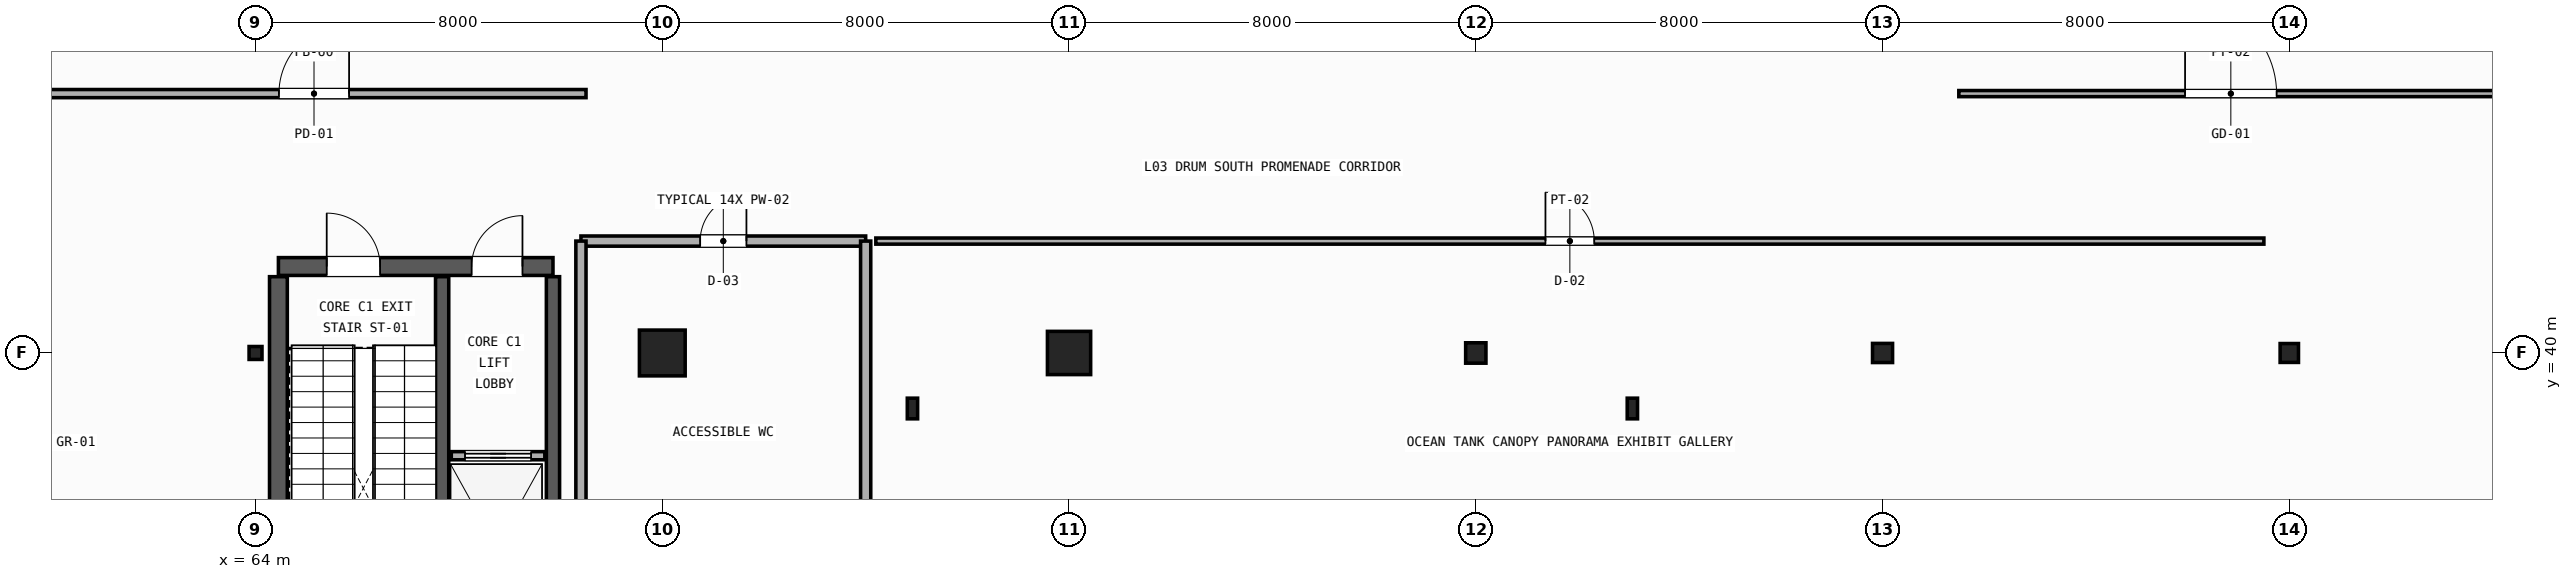
"""IFC4 building model, lengths in metres.
Left out: names, types, materials, properties, quantities, classifications, styles, units other than length and angle.
Written with IfcOpenShell. Run it as: python <this file> out.ifc"""

import sys

from ifc_helpers import new_model, si_unit, direction, frame, frame_2d, origin, origin_2d, place, context, subcontext, project, spatial, rectangle, hollow_rectangle, circle, i_section, extrude, element, fill, save


model = new_model("IFC4")
c1 = context("Model", 3, precision=1e-05, world=origin(), true_north=direction((0.0, 1.0)))
c2 = subcontext(c1, "Body", "Model", "MODEL_VIEW")
j1 = project(units=[si_unit("LENGTHUNIT", "METRE"), si_unit("PLANEANGLEUNIT", "RADIAN")], contexts=[c1])
p1 = place(None, origin())
s1 = spatial("IfcSite", under=j1, at=p1, CompositionType="ELEMENT")
p2 = place(p1, origin())
s2 = spatial("IfcBuilding", under=s1, at=p2, CompositionType="ELEMENT")
p3 = place(p2, frame((0.0, 0.0, 15.0)))
s3 = spatial("IfcBuildingStorey", under=s2, at=p3, CompositionType="ELEMENT", Elevation=15.0)
p4 = place(p3, frame((64.0, 40.0, 0.0), z_axis=(0.0, 0.0, 1.0), x_axis=(1.0, 0.0, 0.0)))
e1 = element("IfcColumn", 1, at=p4, inside=s3, PredefinedType="COLUMN", context=c2, shape_type="SweptSolid", body=[
    extrude(hollow_rectangle(XDim=0.254, YDim=0.254, WallThickness=0.012, InnerFilletRadius=0.012, OuterFilletRadius=0.024, at=origin_2d()), origin(), (0.0, 0.0, 1.0), 4.56),
])
p5 = place(p3, frame((72.0, 40.0, 0.0), z_axis=(0.0, 0.0, 1.0), x_axis=(0.0, 1.0, 0.0)))
e2 = element("IfcColumn", 2, at=p5, inside=s3, PredefinedType="COLUMN", context=c2, shape_type="SweptSolid", body=[
    extrude(rectangle(XDim=0.9, YDim=0.9, at=origin_2d()), origin(), (0.0, 0.0, 1.0), 4.56),
])
p6 = place(p3, frame((80.0, 40.0, 0.0), z_axis=(0.0, 0.0, 1.0), x_axis=(1.0, 0.0, 0.0)))
e3 = element("IfcColumn", 3, at=p6, inside=s3, PredefinedType="COLUMN", context=c2, shape_type="SweptSolid", body=[
    extrude(circle(Radius=0.425, at=origin_2d()), origin(), (0.0, 0.0, 1.0), 4.56),
])
p7 = place(p3, frame((88.0, 40.0, 0.0), z_axis=(0.0, 0.0, 1.0), x_axis=(0.0, 1.0, 0.0)))
e4 = element("IfcColumn", 4, at=p7, inside=s3, PredefinedType="COLUMN", context=c2, shape_type="SweptSolid", body=[
    extrude(i_section(OverallWidth=0.401, OverallDepth=0.399, WebThickness=0.025, FlangeThickness=0.04, FilletRadius=0.015, at=origin_2d()), origin(), (0.0, 0.0, 1.0), 4.56),
])
p8 = place(p3, frame((96.0, 40.0, 0.0), z_axis=(0.0, 0.0, 1.0), x_axis=(1.0, 0.0, 0.0)))
e5 = element("IfcColumn", 5, at=p8, inside=s3, PredefinedType="COLUMN", context=c2, shape_type="SweptSolid", body=[
    extrude(i_section(OverallWidth=0.394, OverallDepth=0.376, WebThickness=0.017, FlangeThickness=0.028, FilletRadius=0.015, at=origin_2d()), origin(), (0.0, 0.0, 1.0), 4.56),
])
p9 = place(p3, frame((104.0, 40.0, 0.0), z_axis=(0.0, 0.0, 1.0), x_axis=(0.0, 1.0, 0.0)))
e6 = element("IfcColumn", 6, at=p9, inside=s3, PredefinedType="COLUMN", context=c2, shape_type="SweptSolid", body=[
    extrude(i_section(OverallWidth=0.371, OverallDepth=0.361, WebThickness=0.012, FlangeThickness=0.02, FilletRadius=0.015, at=origin_2d()), origin(), (0.0, 0.0, 1.0), 4.56),
])
for number, where, z_axis, x_axis in (
    (7, (76.92, 38.908, 0.0), (0.0, 0.0, 1.0), (1.0, 0.0, 0.0)),
    (8, (91.08, 38.908, 0.0), (0.0, 0.0, 1.0), (1.0, 0.0, 0.0)),
):
    element("IfcColumn", number, at=place(p3, frame(where, z_axis=z_axis, x_axis=x_axis)), inside=s3, PredefinedType="COLUMN", context=c2, shape_type="SweptSolid", body=[
        extrude(hollow_rectangle(XDim=0.203, YDim=0.406, WallThickness=0.012, InnerFilletRadius=0.012, OuterFilletRadius=0.024, at=origin_2d()), origin(), (0.0, 0.0, 1.0), 4.54),
    ])
p10 = place(p3, frame((64.45, 41.7, 0.0), z_axis=(0.0, 0.0, 1.0), x_axis=(1.0, 0.0, 0.0)))
e9 = element("IfcWall", 9, at=p10, inside=s3, PredefinedType="SHEAR", context=c2, shape_type="SweptSolid", body=[
    extrude(rectangle(XDim=5.4, YDim=0.35, at=frame_2d((2.7, 0.0))), origin(), (0.0, 0.0, 1.0), 4.55),
])
p11 = place(p10, frame((0.95, 0.0, 0.0)))
e10 = element("IfcOpeningElement", 10, at=p11, cuts=e9, PredefinedType="OPENING", context=c2, shape_type="SweptSolid", body=[
    extrude(rectangle(XDim=1.05, YDim=2.1, at=frame_2d((0.525, 1.05))), frame((0.0, 0.185, 0.0), z_axis=(0.0, -1.0, 0.0), x_axis=(1.0, 0.0, 0.0)), (0.0, 0.0, 1.0), 0.37),
])
p12 = place(p10, frame((3.8, 0.0, 0.0)))
e11 = element("IfcOpeningElement", 11, at=p12, cuts=e9, PredefinedType="OPENING", context=c2, shape_type="SweptSolid", body=[
    extrude(rectangle(XDim=1.0, YDim=2.15, at=frame_2d((0.5, 1.075))), frame((0.0, 0.185, 0.0), z_axis=(0.0, -1.0, 0.0), x_axis=(1.0, 0.0, 0.0)), (0.0, 0.0, 1.0), 0.37),
])
p13 = place(p3, frame((64.45, 34.55, 0.0), z_axis=(0.0, 0.0, 1.0), x_axis=(0.0, 1.0, 0.0)))
e12 = element("IfcWall", 12, at=p13, inside=s3, PredefinedType="SHEAR", context=c2, shape_type="SweptSolid", body=[
    extrude(rectangle(XDim=6.95, YDim=0.35, at=frame_2d((3.475, 0.0))), origin(), (0.0, 0.0, 1.0), 4.55),
])
for number, where, z_axis, x_axis in (
    (13, (69.85, 34.55, 0.0), (0.0, 0.0, 1.0), (0.0, 1.0, 0.0)),
    (14, (67.67, 34.55, 0.0), (0.0, 0.0, 1.0), (0.0, 1.0, 0.0)),
):
    element("IfcWall", number, at=place(p3, frame(where, z_axis=z_axis, x_axis=x_axis)), inside=s3, PredefinedType="SHEAR", context=c2, shape_type="SweptSolid", body=[
        extrude(rectangle(XDim=6.95, YDim=0.26, at=frame_2d((3.475, 0.0))), origin(), (0.0, 0.0, 1.0), 4.55),
    ])
p14 = place(p3, frame((67.85, 37.98, 0.0), z_axis=(0.0, 0.0, 1.0), x_axis=(1.0, 0.0, 0.0)))
e15 = element("IfcWall", 15, at=p14, inside=s3, PredefinedType="PARTITIONING", context=c2, shape_type="SweptSolid", body=[
    extrude(rectangle(XDim=1.84, YDim=0.16, at=frame_2d((0.92, 0.0))), origin(), (0.0, 0.0, 1.0), 3.6),
])
p15 = place(p14, frame((0.27, 0.0, 0.0)))
e16 = element("IfcOpeningElement", 16, at=p15, cuts=e15, PredefinedType="OPENING", context=c2, shape_type="SweptSolid", body=[
    extrude(rectangle(XDim=1.3, YDim=2.2, at=frame_2d((0.65, 1.1))), frame((0.0, 0.09, 0.0), z_axis=(0.0, -1.0, 0.0), x_axis=(1.0, 0.0, 0.0)), (0.0, 0.0, 1.0), 0.18),
])
p16 = place(p3, frame((70.4, 42.2, 0.0), z_axis=(0.0, 0.0, 1.0), x_axis=(1.0, 0.0, 0.0)))
e17 = element("IfcWall", 17, at=p16, inside=s3, PredefinedType="PLUMBINGWALL", context=c2, shape_type="SweptSolid", body=[
    extrude(rectangle(XDim=5.6, YDim=0.2, at=frame_2d((2.8, 0.0))), origin(), (0.0, 0.0, 1.0), 4.29),
])
p17 = place(p16, frame((2.345, 0.0, 0.0)))
e18 = element("IfcOpeningElement", 18, at=p17, cuts=e17, PredefinedType="OPENING", context=c2, shape_type="SweptSolid", body=[
    extrude(rectangle(XDim=0.91, YDim=2.1, at=frame_2d((0.455, 1.05))), frame((0.0, 0.11, 0.0), z_axis=(0.0, -1.0, 0.0), x_axis=(1.0, 0.0, 0.0)), (0.0, 0.0, 1.0), 0.22),
])
p18 = place(p3, frame((70.4, 34.0, 0.0), z_axis=(0.0, 0.0, 1.0), x_axis=(0.0, 1.0, 0.0)))
e19 = element("IfcWall", 19, at=p18, inside=s3, PredefinedType="PLUMBINGWALL", context=c2, shape_type="SweptSolid", body=[
    extrude(rectangle(XDim=8.2, YDim=0.2, at=frame_2d((4.1, 0.0))), origin(), (0.0, 0.0, 1.0), 3.987),
])
p19 = place(p3, frame((76.0, 34.0, 0.0), z_axis=(0.0, 0.0, 1.0), x_axis=(0.0, 1.0, 0.0)))
e20 = element("IfcWall", 20, at=p19, inside=s3, PredefinedType="PLUMBINGWALL", context=c2, shape_type="SweptSolid", body=[
    extrude(rectangle(XDim=8.2, YDim=0.2, at=frame_2d((4.1, 0.0))), origin(), (0.0, 0.0, 1.0), 3.758),
])
p20 = place(p3, frame((76.2, 42.2, 0.0), z_axis=(0.0, 0.0, 1.0), x_axis=(1.0, 0.0, 0.0)))
e21 = element("IfcWall", 21, at=p20, inside=s3, PredefinedType="PARTITIONING", context=c2, shape_type="SweptSolid", body=[
    extrude(rectangle(XDim=27.3, YDim=0.12, at=frame_2d((13.65, 0.0))), origin(), (0.0, 0.0, 1.0), 4.29),
])
p21 = place(p20, frame((13.17, 0.0, 0.0)))
e22 = element("IfcOpeningElement", 22, at=p21, cuts=e21, PredefinedType="OPENING", context=c2, shape_type="SweptSolid", body=[
    extrude(rectangle(XDim=0.96, YDim=2.1, at=frame_2d((0.48, 1.05))), frame((0.0, 0.07, 0.0), z_axis=(0.0, -1.0, 0.0), x_axis=(1.0, 0.0, 0.0)), (0.0, 0.0, 1.0), 0.14),
])
p22 = place(p3, frame((59.8, 45.1, 0.0), z_axis=(0.0, 0.0, 1.0), x_axis=(1.0, 0.0, 0.0)))
e23 = element("IfcWall", 23, at=p22, inside=s3, PredefinedType="PARTITIONING", context=c2, shape_type="SweptSolid", body=[
    extrude(rectangle(XDim=10.7, YDim=0.16, at=frame_2d((5.35, 0.0))), origin(), (0.0, 0.0, 1.0), 3.767),
])
p23 = place(p22, frame((4.66, 0.0, 0.0)))
e24 = element("IfcOpeningElement", 24, at=p23, cuts=e23, PredefinedType="OPENING", context=c2, shape_type="SweptSolid", body=[
    extrude(rectangle(XDim=1.38, YDim=2.25, at=frame_2d((0.69, 1.125))), frame((0.0, 0.09, 0.0), z_axis=(0.0, -1.0, 0.0), x_axis=(1.0, 0.0, 0.0)), (0.0, 0.0, 1.0), 0.18),
])
p24 = place(p3, frame((97.5, 45.1, 0.0), z_axis=(0.0, 0.0, 1.0), x_axis=(1.0, 0.0, 0.0)))
e25 = element("IfcWall", 25, at=p24, inside=s3, PredefinedType="PARTITIONING", context=c2, shape_type="SweptSolid", body=[
    extrude(rectangle(XDim=10.7, YDim=0.12, at=frame_2d((5.35, 0.0))), origin(), (0.0, 0.0, 1.0), 3.918),
])
p25 = place(p24, frame((4.45, 0.0, 0.0)))
e26 = element("IfcOpeningElement", 26, at=p25, cuts=e25, PredefinedType="OPENING", context=c2, shape_type="SweptSolid", body=[
    extrude(rectangle(XDim=1.8, YDim=2.4, at=frame_2d((0.9, 1.2))), frame((0.0, 0.07, 0.0), z_axis=(0.0, -1.0, 0.0), x_axis=(1.0, 0.0, 0.0)), (0.0, 0.0, 1.0), 0.14),
])
p26 = place(p15, origin())
e27 = element("IfcDoor", 27, at=p26, inside=s3, OperationType="SLIDING_TO_LEFT", PredefinedType="DOOR", context=c2, shape_type="SweptSolid", body=[
    extrude(rectangle(XDim=1.3, YDim=2.2, at=frame_2d((0.65, 1.1))), frame((0.0, 0.025, 0.0), z_axis=(0.0, -1.0, 0.0), x_axis=(1.0, 0.0, 0.0)), (0.0, 0.0, 1.0), 0.05),
])
fill(e16, e27)
p27 = place(p11, origin())
e28 = element("IfcDoor", 28, at=p27, inside=s3, OperationType="SINGLE_SWING_LEFT", PredefinedType="DOOR", context=c2, shape_type="SweptSolid", body=[
    extrude(rectangle(XDim=1.05, YDim=2.1, at=frame_2d((0.525, 1.05))), frame((0.0, 0.025, 0.0), z_axis=(0.0, -1.0, 0.0), x_axis=(1.0, 0.0, 0.0)), (0.0, 0.0, 1.0), 0.05),
])
fill(e10, e28)
p28 = place(p12, origin())
e29 = element("IfcDoor", 29, at=p28, inside=s3, OperationType="SINGLE_SWING_RIGHT", PredefinedType="DOOR", context=c2, shape_type="SweptSolid", body=[
    extrude(rectangle(XDim=1.0, YDim=2.15, at=frame_2d((0.5, 1.075))), frame((0.0, 0.025, 0.0), z_axis=(0.0, -1.0, 0.0), x_axis=(1.0, 0.0, 0.0)), (0.0, 0.0, 1.0), 0.05),
])
fill(e11, e29)
p29 = place(p17, origin())
e30 = element("IfcDoor", 30, at=p29, inside=s3, OperationType="SINGLE_SWING_RIGHT", PredefinedType="DOOR", context=c2, shape_type="SweptSolid", body=[
    extrude(rectangle(XDim=0.91, YDim=2.1, at=frame_2d((0.455, 1.05))), frame((0.0, 0.025, 0.0), z_axis=(0.0, -1.0, 0.0), x_axis=(1.0, 0.0, 0.0)), (0.0, 0.0, 1.0), 0.05),
])
fill(e18, e30)
p30 = place(p21, origin())
e31 = element("IfcDoor", 31, at=p30, inside=s3, OperationType="SINGLE_SWING_LEFT", PredefinedType="DOOR", context=c2, shape_type="SweptSolid", body=[
    extrude(rectangle(XDim=0.96, YDim=2.1, at=frame_2d((0.48, 1.05))), frame((0.0, 0.025, 0.0), z_axis=(0.0, -1.0, 0.0), x_axis=(1.0, 0.0, 0.0)), (0.0, 0.0, 1.0), 0.05),
])
fill(e22, e31)
p31 = place(p23, origin())
e32 = element("IfcDoor", 32, at=p31, inside=s3, OperationType="SINGLE_SWING_RIGHT", PredefinedType="DOOR", context=c2, shape_type="SweptSolid", body=[
    extrude(rectangle(XDim=1.38, YDim=2.25, at=frame_2d((0.69, 1.125))), frame((0.0, 0.025, 0.0), z_axis=(0.0, -1.0, 0.0), x_axis=(1.0, 0.0, 0.0)), (0.0, 0.0, 1.0), 0.05),
])
fill(e24, e32)
p32 = place(p25, origin())
e33 = element("IfcDoor", 33, at=p32, inside=s3, OperationType="SINGLE_SWING_LEFT", PredefinedType="DOOR", context=c2, shape_type="SweptSolid", body=[
    extrude(rectangle(XDim=1.8, YDim=2.4, at=frame_2d((0.9, 1.2))), frame((0.0, 0.025, 0.0), z_axis=(0.0, -1.0, 0.0), x_axis=(1.0, 0.0, 0.0)), (0.0, 0.0, 1.0), 0.05),
])
fill(e26, e33)
save(model, sys.argv[1])
